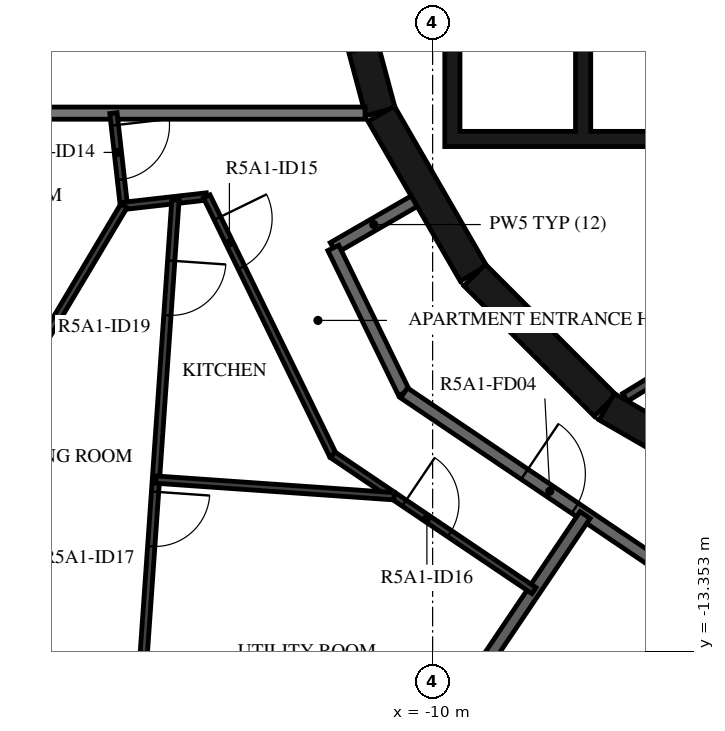
"""IFC4 building model, lengths in metres.
Left out: names, types, materials, properties, quantities, classifications, styles, units other than length and angle.
Written with IfcOpenShell. Run it as: python <this file> out.ifc"""

import sys

from ifc_helpers import new_model, si_unit, direction, frame, frame_2d, origin, place, context, subcontext, project, spatial, polyline, rectangle, outline, extrude, element, fill, save


model = new_model("IFC4")
c1 = context("Model", 3, precision=1e-05, world=origin(), true_north=direction((0.0, 1.0)))
c2 = subcontext(c1, "Body", "Model", "MODEL_VIEW")
j1 = project(units=[si_unit("LENGTHUNIT", "METRE"), si_unit("PLANEANGLEUNIT", "RADIAN")], contexts=[c1])
p1 = place(None, origin())
s1 = spatial("IfcSite", under=j1, at=p1, CompositionType="ELEMENT")
p2 = place(p1, origin())
s2 = spatial("IfcBuilding", under=s1, at=p2, CompositionType="ELEMENT")
p3 = place(p2, frame((0.0, 0.0, 191.9)))
s3 = spatial("IfcBuildingStorey", under=s2, at=p3, CompositionType="ELEMENT", Elevation=191.9)
p4 = place(p3, frame((-11.643, -1.55, 0.0), z_axis=(0.0, 0.0, 1.0), x_axis=(0.258734743916, -0.965948410781, 0.0)))
e1 = element("IfcWall", 1, at=p4, inside=s3, PredefinedType="SHEAR", context=c2, shape_type="SweptSolid", body=[
    extrude(rectangle(XDim=3.033, YDim=0.5, at=frame_2d((1.516, 0.0))), origin(), (0.0, 0.0, 1.0), 3.12),
])
p5 = place(p4, frame((1.066, 0.0, 0.0)))
e2 = element("IfcOpeningElement", 2, at=p5, cuts=e1, PredefinedType="OPENING", context=c2, shape_type="SweptSolid", body=[
    extrude(rectangle(XDim=0.9, YDim=2.1, at=frame_2d((0.45, 1.05))), frame((0.0, 0.26, 0.0), z_axis=(0.0, -1.0, 0.0), x_axis=(1.0, 0.0, 0.0)), (0.0, 0.0, 1.0), 0.52),
])
p6 = place(p3, frame((-10.845, -4.51, 0.0), z_axis=(0.0, 0.0, 1.0), x_axis=(0.500087131594, -0.865975092491, 0.0)))
e3 = element("IfcWall", 3, at=p6, inside=s3, PredefinedType="SHEAR", context=c2, shape_type="SweptSolid", body=[
    extrude(rectangle(XDim=3.033, YDim=0.5, at=frame_2d((1.516, 0.0))), origin(), (0.0, 0.0, 1.0), 3.12),
])
p7 = place(p3, frame((-9.308, -7.164, 0.0), z_axis=(0.0, 0.0, 1.0), x_axis=(0.707106781187, -0.707106781187, 0.0)))
e4 = element("IfcWall", 4, at=p7, inside=s3, PredefinedType="SHEAR", context=c2, shape_type="SweptSolid", body=[
    extrude(rectangle(XDim=3.032, YDim=0.5, at=frame_2d((1.516, 0.0))), origin(), (0.0, 0.0, 1.0), 3.12),
])
p8 = place(p3, frame((-7.137, -9.329, 0.0), z_axis=(0.0, 0.0, 1.0), x_axis=(0.865975092491, -0.500087131594, 0.0)))
e5 = element("IfcWall", 5, at=p8, inside=s3, PredefinedType="SHEAR", context=c2, shape_type="SweptSolid", body=[
    extrude(rectangle(XDim=3.033, YDim=0.5, at=frame_2d((1.516, 0.0))), origin(), (0.0, 0.0, 1.0), 3.12),
])
p9 = place(p3, origin())
e6 = element("IfcWall", 6, at=p9, inside=s3, PredefinedType="SHEAR", context=c2, shape_type="SweptSolid", body=[
    extrude(outline(polyline([(9.8, -5.05), (9.8, -4.8), (9.8, -1.9), (9.55, -1.9), (9.55, -4.8), (7.65, -4.8), (7.65, -1.9), (7.4, -1.9), (7.4, -4.8), (5.5, -4.8), (5.5, -1.9), (5.25, -1.9), (5.25, -4.8), (3.35, -4.8), (3.35, -1.9), (3.1, -1.9), (3.1, -4.8), (1.2, -4.8), (1.2, -1.9), (0.95, -1.9), (0.95, -4.8), (-0.95, -4.8), (-0.95, -1.9), (-1.2, -1.9), (-1.2, -4.8), (-3.1, -4.8), (-3.1, -1.9), (-3.35, -1.9), (-3.35, -4.8), (-5.25, -4.8), (-5.25, -1.9), (-5.5, -1.9), (-5.5, -4.8), (-7.4, -4.8), (-7.4, -1.9), (-7.65, -1.9), (-7.65, -4.8), (-9.55, -4.8), (-9.55, -1.9), (-9.8, -1.9), (-9.8, -4.8), (-9.8, -5.05), (9.8, -5.05)])), origin(), (0.0, 0.0, 1.0), 3.12),
])
p10 = place(p3, frame((-2.451, -6.495, 0.0), z_axis=(0.0, 0.0, 1.0), x_axis=(-0.853250115418, -0.521501908471, 0.0)))
e7 = element("IfcWall", 7, at=p10, inside=s3, PredefinedType="PARTITIONING", context=c2, shape_type="SweptSolid", body=[
    extrude(rectangle(XDim=5.137, YDim=0.15, at=frame_2d((2.569, 0.0))), origin(), (0.0, 0.0, 1.0), 3.12),
])
p11 = place(p10, frame((2.119, 0.0, 0.0)))
e8 = element("IfcOpeningElement", 8, at=p11, cuts=e7, PredefinedType="OPENING", context=c2, shape_type="SweptSolid", body=[
    extrude(rectangle(XDim=0.9, YDim=2.1, at=frame_2d((0.45, 1.05))), frame((0.0, 0.085, 0.0), z_axis=(0.0, -1.0, 0.0), x_axis=(1.0, 0.0, 0.0)), (0.0, 0.0, 1.0), 0.17),
])
p12 = place(p3, frame((-10.303, -5.949, 0.0), z_axis=(0.0, 0.0, 1.0), x_axis=(-0.866042588199, -0.499970234539, 0.0)))
e9 = element("IfcWall", 9, at=p12, inside=s3, PredefinedType="STANDARD", context=c2, shape_type="SweptSolid", body=[
    extrude(rectangle(XDim=1.535, YDim=0.2, at=frame_2d((0.768, 0.0))), origin(), (0.0, 0.0, 1.0), 3.12),
])
p13 = place(p3, frame((-11.633, -6.716, 0.0), z_axis=(0.0, 0.0, 1.0), x_axis=(0.438322116278, -0.898817958422, 0.0)))
e10 = element("IfcWall", 10, at=p13, inside=s3, PredefinedType="STANDARD", context=c2, shape_type="SweptSolid", body=[
    extrude(rectangle(XDim=2.654, YDim=0.2, at=frame_2d((1.327, 0.0))), origin(), (0.0, 0.0, 1.0), 3.12),
])
p14 = place(p3, frame((-10.47, -9.101, 0.0), z_axis=(0.0, 0.0, 1.0), x_axis=(0.829035841718, -0.559195469534, 0.0)))
e11 = element("IfcWall", 11, at=p14, inside=s3, PredefinedType="STANDARD", context=c2, shape_type="SweptSolid", body=[
    extrude(rectangle(XDim=7.181, YDim=0.2, at=frame_2d((3.591, 0.0))), origin(), (0.0, 0.0, 1.0), 3.12),
])
p15 = place(p14, frame((2.39, 0.0, 0.0)))
e12 = element("IfcOpeningElement", 12, at=p15, cuts=e11, PredefinedType="OPENING", context=c2, shape_type="SweptSolid", body=[
    extrude(rectangle(XDim=1.0, YDim=2.1, at=frame_2d((0.5, 1.05))), frame((0.0, 0.11, 0.0), z_axis=(0.0, -1.0, 0.0), x_axis=(1.0, 0.0, 0.0)), (0.0, 0.0, 1.0), 0.22),
])
p16 = place(p3, frame((-17.9, -4.5, 0.0), z_axis=(0.0, 0.0, 1.0), x_axis=(1.0, 0.0, 0.0)))
e13 = element("IfcWall", 13, at=p16, inside=s3, PredefinedType="STANDARD", context=c2, shape_type="SweptSolid", body=[
    extrude(rectangle(XDim=6.789, YDim=0.2, at=frame_2d((3.394, 0.0))), origin(), (0.0, 0.0, 1.0), 3.12),
])
p17 = place(p3, frame((-10.407, -15.43, 0.0), z_axis=(0.0, 0.0, 1.0), x_axis=(0.559038328133, 0.829141813973, 0.0)))
e14 = element("IfcWall", 14, at=p17, inside=s3, PredefinedType="STANDARD", context=c2, shape_type="SweptSolid", body=[
    extrude(rectangle(XDim=5.212, YDim=0.2, at=frame_2d((2.606, 0.0))), origin(), (0.0, 0.0, 1.0), 3.12),
])
p18 = place(p3, frame((-15.25, -4.5, 0.0), z_axis=(0.0, 0.0, 1.0), x_axis=(0.1124919794, -0.99365263275, 0.0)))
e15 = element("IfcWall", 15, at=p18, inside=s3, PredefinedType="PARTITIONING", context=c2, shape_type="SweptSolid", body=[
    extrude(rectangle(XDim=1.534, YDim=0.12, at=frame_2d((0.767, 0.0))), origin(), (0.0, 0.0, 1.0), 3.12),
])
p19 = place(p18, frame((0.2, 0.0, 0.0)))
e16 = element("IfcOpeningElement", 16, at=p19, cuts=e15, PredefinedType="OPENING", context=c2, shape_type="SweptSolid", body=[
    extrude(rectangle(XDim=0.9, YDim=2.1, at=frame_2d((0.45, 1.05))), frame((0.0, 0.07, 0.0), z_axis=(0.0, -1.0, 0.0), x_axis=(1.0, 0.0, 0.0)), (0.0, 0.0, 1.0), 0.14),
])
p20 = place(p3, frame((-15.077, -6.025, 0.0), z_axis=(0.0, 0.0, 1.0), x_axis=(0.993646958109, 0.112542092746, 0.0)))
e17 = element("IfcWall", 17, at=p20, inside=s3, PredefinedType="PARTITIONING", context=c2, shape_type="SweptSolid", body=[
    extrude(rectangle(XDim=1.371, YDim=0.12, at=frame_2d((0.686, 0.0))), origin(), (0.0, 0.0, 1.0), 3.12),
])
p21 = place(p3, frame((-13.715, -5.87, 0.0), z_axis=(0.0, 0.0, 1.0), x_axis=(0.438372766482, -0.89879325632, 0.0)))
e18 = element("IfcWall", 18, at=p21, inside=s3, PredefinedType="PARTITIONING", context=c2, shape_type="SweptSolid", body=[
    extrude(rectangle(XDim=4.728, YDim=0.12, at=frame_2d((2.364, 0.0))), origin(), (0.0, 0.0, 1.0), 3.12),
])
p22 = place(p21, frame((0.4, 0.0, 0.0)))
e19 = element("IfcOpeningElement", 19, at=p22, cuts=e18, PredefinedType="OPENING", context=c2, shape_type="SweptSolid", body=[
    extrude(rectangle(XDim=0.9, YDim=2.1, at=frame_2d((0.45, 1.05))), frame((0.0, 0.07, 0.0), z_axis=(0.0, -1.0, 0.0), x_axis=(1.0, 0.0, 0.0)), (0.0, 0.0, 1.0), 0.14),
])
p23 = place(p3, frame((-11.642, -10.12, 0.0), z_axis=(0.0, 0.0, 1.0), x_axis=(0.829018066952, -0.559221820629, 0.0)))
e20 = element("IfcWall", 20, at=p23, inside=s3, PredefinedType="PARTITIONING", context=c2, shape_type="SweptSolid", body=[
    extrude(rectangle(XDim=3.992, YDim=0.12, at=frame_2d((1.996, 0.0))), origin(), (0.0, 0.0, 1.0), 3.12),
])
p24 = place(p23, frame((1.417, 0.0, 0.0)))
e21 = element("IfcOpeningElement", 21, at=p24, cuts=e20, PredefinedType="OPENING", context=c2, shape_type="SweptSolid", body=[
    extrude(rectangle(XDim=0.9, YDim=2.1, at=frame_2d((0.45, 1.05))), frame((0.0, 0.07, 0.0), z_axis=(0.0, -1.0, 0.0), x_axis=(1.0, 0.0, 0.0)), (0.0, 0.0, 1.0), 0.14),
])
p25 = place(p3, frame((-19.156, -12.863, 0.0), z_axis=(0.0, 0.0, 1.0), x_axis=(0.512316386407, 0.858796786335, 0.0)))
e22 = element("IfcWall", 22, at=p25, inside=s3, PredefinedType="PARTITIONING", context=c2, shape_type="SweptSolid", body=[
    extrude(rectangle(XDim=7.963, YDim=0.12, at=frame_2d((3.981, 0.0))), origin(), (0.0, 0.0, 1.0), 3.12),
])
p26 = place(p3, frame((-14.229, -5.929, 0.0), z_axis=(0.0, 0.0, 1.0), x_axis=(-0.069740723375, -0.997565151508, 0.0)))
e23 = element("IfcWall", 23, at=p26, inside=s3, PredefinedType="PARTITIONING", context=c2, shape_type="SweptSolid", body=[
    extrude(rectangle(XDim=10.47, YDim=0.12, at=frame_2d((5.235, 0.0))), origin(), (0.0, 0.0, 1.0), 3.12),
])
p27 = place(p26, frame((4.809, 0.0, 0.0)))
e24 = element("IfcOpeningElement", 24, at=p27, cuts=e23, PredefinedType="OPENING", context=c2, shape_type="SweptSolid", body=[
    extrude(rectangle(XDim=0.9, YDim=2.1, at=frame_2d((0.45, 1.05))), frame((0.0, 0.07, 0.0), z_axis=(0.0, -1.0, 0.0), x_axis=(1.0, 0.0, 0.0)), (0.0, 0.0, 1.0), 0.14),
])
p28 = place(p26, frame((1.0, 0.0, 0.0)))
e25 = element("IfcOpeningElement", 25, at=p28, cuts=e23, PredefinedType="OPENING", context=c2, shape_type="SweptSolid", body=[
    extrude(rectangle(XDim=0.9, YDim=2.1, at=frame_2d((0.45, 1.05))), frame((0.0, 0.07, 0.0), z_axis=(0.0, -1.0, 0.0), x_axis=(1.0, 0.0, 0.0)), (0.0, 0.0, 1.0), 0.14),
])
p29 = place(p3, frame((-14.551, -10.527, 0.0), z_axis=(0.0, 0.0, 1.0), x_axis=(0.997564247633, -0.069753651118, 0.0)))
e26 = element("IfcWall", 26, at=p29, inside=s3, PredefinedType="PARTITIONING", context=c2, shape_type="SweptSolid", body=[
    extrude(rectangle(XDim=3.927, YDim=0.12, at=frame_2d((1.963, 0.0))), origin(), (0.0, 0.0, 1.0), 3.12),
])
p30 = place(p15, origin())
e27 = element("IfcDoor", 27, at=p30, inside=s3, OperationType="SINGLE_SWING_RIGHT", PredefinedType="DOOR", context=c2, shape_type="SweptSolid", body=[
    extrude(rectangle(XDim=1.0, YDim=2.1, at=frame_2d((0.5, 1.05))), frame((0.0, 0.025, 0.0), z_axis=(0.0, -1.0, 0.0), x_axis=(1.0, 0.0, 0.0)), (0.0, 0.0, 1.0), 0.05),
])
fill(e12, e27)
p31 = place(p19, origin())
e28 = element("IfcDoor", 28, at=p31, inside=s3, OperationType="SINGLE_SWING_RIGHT", PredefinedType="DOOR", context=c2, shape_type="SweptSolid", body=[
    extrude(rectangle(XDim=0.9, YDim=2.1, at=frame_2d((0.45, 1.05))), frame((0.0, 0.025, 0.0), z_axis=(0.0, -1.0, 0.0), x_axis=(1.0, 0.0, 0.0)), (0.0, 0.0, 1.0), 0.05),
])
fill(e16, e28)
p32 = place(p22, origin())
e29 = element("IfcDoor", 29, at=p32, inside=s3, OperationType="SINGLE_SWING_RIGHT", PredefinedType="DOOR", context=c2, shape_type="SweptSolid", body=[
    extrude(rectangle(XDim=0.9, YDim=2.1, at=frame_2d((0.45, 1.05))), frame((0.0, 0.025, 0.0), z_axis=(0.0, -1.0, 0.0), x_axis=(1.0, 0.0, 0.0)), (0.0, 0.0, 1.0), 0.05),
])
fill(e19, e29)
p33 = place(p24, origin())
e30 = element("IfcDoor", 30, at=p33, inside=s3, OperationType="SINGLE_SWING_RIGHT", PredefinedType="DOOR", context=c2, shape_type="SweptSolid", body=[
    extrude(rectangle(XDim=0.9, YDim=2.1, at=frame_2d((0.45, 1.05))), frame((0.0, 0.025, 0.0), z_axis=(0.0, -1.0, 0.0), x_axis=(1.0, 0.0, 0.0)), (0.0, 0.0, 1.0), 0.05),
])
fill(e21, e30)
p34 = place(p27, origin())
e31 = element("IfcDoor", 31, at=p34, inside=s3, OperationType="SINGLE_SWING_RIGHT", PredefinedType="DOOR", context=c2, shape_type="SweptSolid", body=[
    extrude(rectangle(XDim=0.9, YDim=2.1, at=frame_2d((0.45, 1.05))), frame((0.0, 0.025, 0.0), z_axis=(0.0, -1.0, 0.0), x_axis=(1.0, 0.0, 0.0)), (0.0, 0.0, 1.0), 0.05),
])
fill(e24, e31)
p35 = place(p28, origin())
e32 = element("IfcDoor", 32, at=p35, inside=s3, OperationType="SINGLE_SWING_LEFT", PredefinedType="DOOR", context=c2, shape_type="SweptSolid", body=[
    extrude(rectangle(XDim=0.9, YDim=2.1, at=frame_2d((0.45, 1.05))), frame((0.0, 0.025, 0.0), z_axis=(0.0, -1.0, 0.0), x_axis=(1.0, 0.0, 0.0)), (0.0, 0.0, 1.0), 0.05),
])
fill(e25, e32)
save(model, sys.argv[1])
